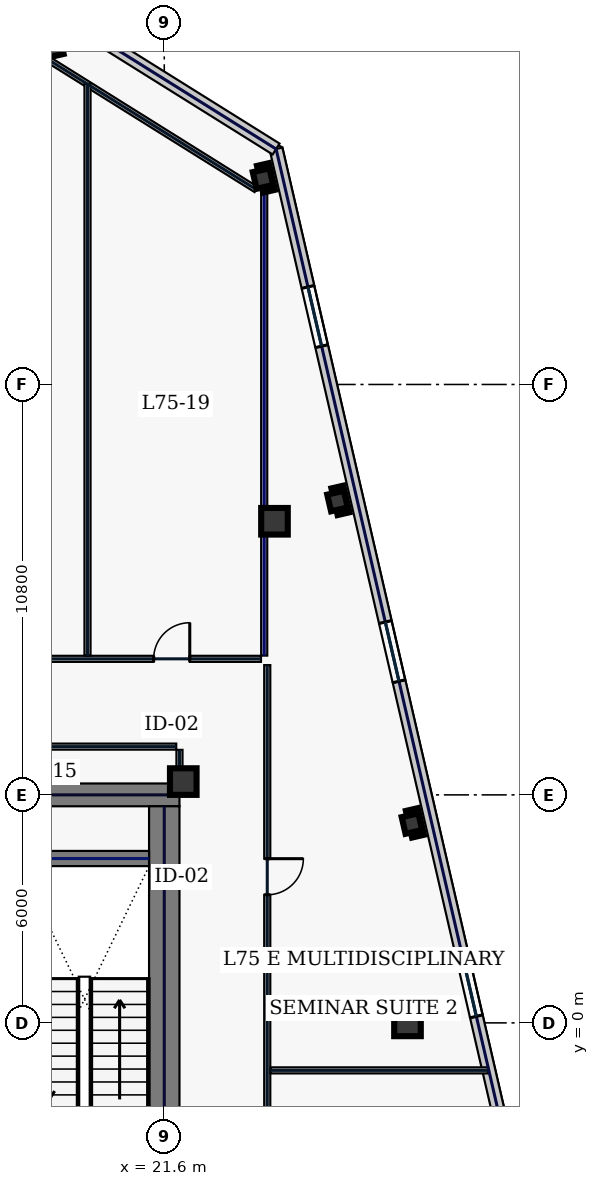
"""IFC4 building model, lengths in metres.
Left out: names, types, materials, properties, quantities, classifications, styles, units other than length and angle.
Written with IfcOpenShell. Run it as: python <this file> out.ifc"""

import sys

from ifc_helpers import new_model, si_unit, direction, frame, frame_2d, origin, origin_2d, place, context, subcontext, project, spatial, rectangle, hollow_rectangle, extrude, element, fill, save


model = new_model("IFC4")
c1 = context("Model", 3, precision=1e-05, world=origin(), true_north=direction((0.0, 1.0)))
c2 = subcontext(c1, "Body", "Model", "MODEL_VIEW")
j1 = project(units=[si_unit("LENGTHUNIT", "METRE"), si_unit("PLANEANGLEUNIT", "RADIAN")], contexts=[c1])
p1 = place(None, origin())
s1 = spatial("IfcSite", under=j1, at=p1, CompositionType="ELEMENT")
p2 = place(p1, origin())
s2 = spatial("IfcBuilding", under=s1, at=p2, CompositionType="ELEMENT")
p3 = place(p2, frame((0.0, 0.0, 321.0)))
s3 = spatial("IfcBuildingStorey", under=s2, at=p3, CompositionType="ELEMENT", Elevation=321.0)
p4 = place(p3, frame((10.5, 6.0, 0.0), z_axis=(0.0, 0.0, 1.0), x_axis=(1.0, 0.0, 0.0)))
e1 = element("IfcWall", 1, at=p4, inside=s3, PredefinedType="SHEAR", context=c2, shape_type="SweptSolid", body=[
    extrude(rectangle(XDim=11.5, YDim=0.6, at=frame_2d((5.75, 0.0))), origin(), (0.0, 0.0, 1.0), 3.74),
])
p5 = place(p3, frame((21.6, -5.7, 0.0), z_axis=(0.0, 0.0, 1.0), x_axis=(0.0, 1.0, 0.0)))
e2 = element("IfcWall", 2, at=p5, inside=s3, PredefinedType="SHEAR", context=c2, shape_type="SweptSolid", body=[
    extrude(rectangle(XDim=11.4, YDim=0.8, at=frame_2d((5.7, 0.0))), origin(), (0.0, 0.0, 1.0), 3.74),
])
p6 = place(p3, frame((17.8, 4.325, 0.0), z_axis=(0.0, 0.0, 1.0), x_axis=(1.0, 0.0, 0.0)))
e3 = element("IfcWall", 3, at=p6, inside=s3, PredefinedType="SHEAR", context=c2, shape_type="SweptSolid", body=[
    extrude(rectangle(XDim=3.4, YDim=0.4, at=frame_2d((1.7, 0.0))), origin(), (0.0, 0.0, 1.0), 3.74),
])
for number, where, z_axis, x_axis in (
    (4, (22.1, 6.35, 0.0), (0.0, 0.0, 1.0), (1.0, 0.0, 0.0)),
    (5, (24.5, 13.2, 0.0), (0.0, 0.0, 1.0), (1.0, 0.0, 0.0)),
    (6, (28.0, 0.0, 0.0), (0.0, 0.0, 1.0), (1.0, 0.0, 0.0)),
):
    element("IfcColumn", number, at=place(p3, frame(where, z_axis=z_axis, x_axis=x_axis)), inside=s3, PredefinedType="COLUMN", context=c2, shape_type="SweptSolid", body=[
        extrude(hollow_rectangle(XDim=0.7, YDim=0.7, WallThickness=0.032, at=origin_2d()), origin(), (0.0, 0.0, 1.0), 3.74),
    ])
for number, where, z_axis, x_axis in (
    (7, (18.682, 25.666, 0.0), (0.0, 0.0, 1.0), (0.974, 0.225, 0.0)),
    (8, (28.117, 5.246, 0.0), (0.0, 0.0, 1.0), (0.974, 0.225, 0.0)),
    (9, (26.158, 13.732, 0.0), (0.0, 0.0, 1.0), (0.974, 0.225, 0.0)),
    (10, (24.198, 22.219, 0.0), (0.0, 0.0, 1.0), (0.974, 0.225, 0.0)),
):
    element("IfcColumn", number, at=place(p3, frame(where, z_axis=z_axis, x_axis=x_axis)), inside=s3, PredefinedType="COLUMN", context=c2, shape_type="SweptSolid", body=[
        extrude(hollow_rectangle(XDim=0.45, YDim=0.45, WallThickness=0.022, at=origin_2d()), origin(), (0.0, 0.0, 1.0), 3.74),
    ])
p7 = place(p3, frame((19.229, 26.316, 0.0), z_axis=(0.0, 0.0, 1.0), x_axis=(-0.974372473594, -0.224940620392, 0.0)))
e11 = element("IfcWall", 11, at=p7, inside=s3, PredefinedType="STANDARD", context=c2, shape_type="SweptSolid", body=[
    extrude(rectangle(XDim=17.366, YDim=0.34, at=frame_2d((8.683, 0.0))), origin(), (0.0, 0.0, 1.0), 3.74),
])
p8 = place(p7, frame((13.187, 0.0, 1.0)))
e12 = element("IfcOpeningElement", 12, at=p8, cuts=e11, PredefinedType="OPENING", context=c2, shape_type="SweptSolid", body=[
    extrude(rectangle(XDim=1.4, YDim=1.85, at=frame_2d((0.7, 0.925))), frame((0.0, 0.18, 0.0), z_axis=(0.0, -1.0, 0.0), x_axis=(1.0, 0.0, 0.0)), (0.0, 0.0, 1.0), 0.36),
])
p9 = place(p7, frame((5.553, 0.0, 1.0)))
e13 = element("IfcOpeningElement", 13, at=p9, cuts=e11, PredefinedType="OPENING", context=c2, shape_type="SweptSolid", body=[
    extrude(rectangle(XDim=1.4, YDim=1.85, at=frame_2d((0.7, 0.925))), frame((0.0, 0.18, 0.0), z_axis=(0.0, -1.0, 0.0), x_axis=(1.0, 0.0, 0.0)), (0.0, 0.0, 1.0), 0.36),
])
p10 = place(p7, frame((2.041, 0.0, 1.0)))
e14 = element("IfcOpeningElement", 14, at=p10, cuts=e11, PredefinedType="OPENING", context=c2, shape_type="SweptSolid", body=[
    extrude(rectangle(XDim=1.4, YDim=1.85, at=frame_2d((0.7, 0.925))), frame((0.0, 0.18, 0.0), z_axis=(0.0, -1.0, 0.0), x_axis=(1.0, 0.0, 0.0)), (0.0, 0.0, 1.0), 0.36),
])
p11 = place(p3, frame((32.686, -12.276, 0.0), z_axis=(0.0, 0.0, 1.0), x_axis=(-0.224953091034, 0.974369594576, 0.0)))
e15 = element("IfcWall", 15, at=p11, inside=s3, PredefinedType="STANDARD", context=c2, shape_type="SweptSolid", body=[
    extrude(rectangle(XDim=36.2, YDim=0.34, at=frame_2d((18.1, 0.0))), origin(), (0.0, 0.0, 1.0), 3.74),
])
p12 = place(p11, frame((3.725, 0.0, 0.58)))
e16 = element("IfcOpeningElement", 16, at=p12, cuts=e15, PredefinedType="OPENING", context=c2, shape_type="SweptSolid", body=[
    extrude(rectangle(XDim=1.6, YDim=2.3, at=frame_2d((0.8, 1.15))), frame((0.0, 0.18, 0.0), z_axis=(0.0, -1.0, 0.0), x_axis=(1.0, 0.0, 0.0)), (0.0, 0.0, 1.0), 0.36),
])
p13 = place(p11, frame((12.775, 0.0, 0.58)))
e17 = element("IfcOpeningElement", 17, at=p13, cuts=e15, PredefinedType="OPENING", context=c2, shape_type="SweptSolid", body=[
    extrude(rectangle(XDim=1.6, YDim=2.3, at=frame_2d((0.8, 1.15))), frame((0.0, 0.18, 0.0), z_axis=(0.0, -1.0, 0.0), x_axis=(1.0, 0.0, 0.0)), (0.0, 0.0, 1.0), 0.36),
])
p14 = place(p11, frame((21.825, 0.0, 0.58)))
e18 = element("IfcOpeningElement", 18, at=p14, cuts=e15, PredefinedType="OPENING", context=c2, shape_type="SweptSolid", body=[
    extrude(rectangle(XDim=1.6, YDim=2.3, at=frame_2d((0.8, 1.15))), frame((0.0, 0.18, 0.0), z_axis=(0.0, -1.0, 0.0), x_axis=(1.0, 0.0, 0.0)), (0.0, 0.0, 1.0), 0.36),
])
p15 = place(p11, frame((30.875, 0.0, 0.58)))
e19 = element("IfcOpeningElement", 19, at=p15, cuts=e15, PredefinedType="OPENING", context=c2, shape_type="SweptSolid", body=[
    extrude(rectangle(XDim=1.6, YDim=2.3, at=frame_2d((0.8, 1.15))), frame((0.0, 0.18, 0.0), z_axis=(0.0, -1.0, 0.0), x_axis=(1.0, 0.0, 0.0)), (0.0, 0.0, 1.0), 0.36),
])
p16 = place(p3, frame((24.542, 22.996, 0.0), z_axis=(0.0, 0.0, 1.0), x_axis=(-0.848055220921, 0.529907862057, 0.0)))
e20 = element("IfcWall", 20, at=p16, inside=s3, PredefinedType="STANDARD", context=c2, shape_type="SweptSolid", body=[
    extrude(rectangle(XDim=6.265, YDim=0.34, at=frame_2d((3.132, 0.0))), origin(), (0.0, 0.0, 1.0), 3.74),
])
p17 = place(p3, frame((24.018, 21.931, 0.0), z_axis=(0.0, 0.0, 1.0), x_axis=(-0.848051009591, 0.529914601736, 0.0)))
e21 = element("IfcWall", 21, at=p17, inside=s3, PredefinedType="PARTITIONING", context=c2, shape_type="SweptSolid", body=[
    extrude(rectangle(XDim=6.505, YDim=0.16, at=frame_2d((3.253, 0.0))), origin(), (0.0, 0.0, 1.0), 3.74),
])
p18 = place(p3, frame((-24.145, 9.58, 0.0), z_axis=(0.0, 0.0, 1.0), x_axis=(1.0, 0.0, 0.0)))
e22 = element("IfcWall", 22, at=p18, inside=s3, PredefinedType="PARTITIONING", context=c2, shape_type="SweptSolid", body=[
    extrude(rectangle(XDim=48.29, YDim=0.16, at=frame_2d((24.145, 0.0))), origin(), (0.0, 0.0, 1.0), 3.74),
])
p19 = place(p18, frame((1.869, 0.0, 0.0)))
e23 = element("IfcOpeningElement", 23, at=p19, cuts=e22, PredefinedType="OPENING", context=c2, shape_type="SweptSolid", body=[
    extrude(rectangle(XDim=1.3, YDim=2.2, at=frame_2d((0.65, 1.1))), frame((0.0, 0.09, 0.0), z_axis=(0.0, -1.0, 0.0), x_axis=(1.0, 0.0, 0.0)), (0.0, 0.0, 1.0), 0.18),
])
p20 = place(p18, frame((8.385, 0.0, 0.0)))
e24 = element("IfcOpeningElement", 24, at=p20, cuts=e22, PredefinedType="OPENING", context=c2, shape_type="SweptSolid", body=[
    extrude(rectangle(XDim=0.95, YDim=2.2, at=frame_2d((0.475, 1.1))), frame((0.0, 0.09, 0.0), z_axis=(0.0, -1.0, 0.0), x_axis=(1.0, 0.0, 0.0)), (0.0, 0.0, 1.0), 0.18),
])
p21 = place(p18, frame((16.475, 0.0, 0.0)))
e25 = element("IfcOpeningElement", 25, at=p21, cuts=e22, PredefinedType="OPENING", context=c2, shape_type="SweptSolid", body=[
    extrude(rectangle(XDim=0.95, YDim=2.2, at=frame_2d((0.475, 1.1))), frame((0.0, 0.09, 0.0), z_axis=(0.0, -1.0, 0.0), x_axis=(1.0, 0.0, 0.0)), (0.0, 0.0, 1.0), 0.18),
])
p22 = place(p18, frame((23.055, 0.0, 0.0)))
e26 = element("IfcOpeningElement", 26, at=p22, cuts=e22, PredefinedType="OPENING", context=c2, shape_type="SweptSolid", body=[
    extrude(rectangle(XDim=0.95, YDim=2.2, at=frame_2d((0.475, 1.1))), frame((0.0, 0.09, 0.0), z_axis=(0.0, -1.0, 0.0), x_axis=(1.0, 0.0, 0.0)), (0.0, 0.0, 1.0), 0.18),
])
p23 = place(p18, frame((29.085, 0.0, 0.0)))
e27 = element("IfcOpeningElement", 27, at=p23, cuts=e22, PredefinedType="OPENING", context=c2, shape_type="SweptSolid", body=[
    extrude(rectangle(XDim=1.45, YDim=2.2, at=frame_2d((0.725, 1.1))), frame((0.0, 0.09, 0.0), z_axis=(0.0, -1.0, 0.0), x_axis=(1.0, 0.0, 0.0)), (0.0, 0.0, 1.0), 0.18),
])
p24 = place(p18, frame((35.82, 0.0, 0.0)))
e28 = element("IfcOpeningElement", 28, at=p24, cuts=e22, PredefinedType="OPENING", context=c2, shape_type="SweptSolid", body=[
    extrude(rectangle(XDim=1.15, YDim=2.2, at=frame_2d((0.575, 1.1))), frame((0.0, 0.09, 0.0), z_axis=(0.0, -1.0, 0.0), x_axis=(1.0, 0.0, 0.0)), (0.0, 0.0, 1.0), 0.18),
])
p25 = place(p18, frame((41.105, 0.0, 0.0)))
e29 = element("IfcOpeningElement", 29, at=p25, cuts=e22, PredefinedType="OPENING", context=c2, shape_type="SweptSolid", body=[
    extrude(rectangle(XDim=0.95, YDim=2.2, at=frame_2d((0.475, 1.1))), frame((0.0, 0.09, 0.0), z_axis=(0.0, -1.0, 0.0), x_axis=(1.0, 0.0, 0.0)), (0.0, 0.0, 1.0), 0.18),
])
p26 = place(p18, frame((45.466, 0.0, 0.0)))
e30 = element("IfcOpeningElement", 30, at=p26, cuts=e22, PredefinedType="OPENING", context=c2, shape_type="SweptSolid", body=[
    extrude(rectangle(XDim=0.95, YDim=2.2, at=frame_2d((0.475, 1.1))), frame((0.0, 0.09, 0.0), z_axis=(0.0, -1.0, 0.0), x_axis=(1.0, 0.0, 0.0)), (0.0, 0.0, 1.0), 0.18),
])
p27 = place(p3, frame((24.31, 9.415, 0.0), z_axis=(0.0, 0.0, 1.0), x_axis=(0.0, -1.0, 0.0)))
e31 = element("IfcWall", 31, at=p27, inside=s3, PredefinedType="PARTITIONING", context=c2, shape_type="SweptSolid", body=[
    extrude(rectangle(XDim=18.63, YDim=0.16, at=frame_2d((9.315, 0.0))), origin(), (0.0, 0.0, 1.0), 3.74),
])
p28 = place(p27, frame((14.106, 0.0, 0.0)))
e32 = element("IfcOpeningElement", 32, at=p28, cuts=e31, PredefinedType="OPENING", context=c2, shape_type="SweptSolid", body=[
    extrude(rectangle(XDim=0.95, YDim=2.2, at=frame_2d((0.475, 1.1))), frame((0.0, 0.09, 0.0), z_axis=(0.0, -1.0, 0.0), x_axis=(1.0, 0.0, 0.0)), (0.0, 0.0, 1.0), 0.18),
])
p29 = place(p27, frame((5.094, 0.0, 0.0)))
e33 = element("IfcOpeningElement", 33, at=p29, cuts=e31, PredefinedType="OPENING", context=c2, shape_type="SweptSolid", body=[
    extrude(rectangle(XDim=0.95, YDim=2.2, at=frame_2d((0.475, 1.1))), frame((0.0, 0.09, 0.0), z_axis=(0.0, -1.0, 0.0), x_axis=(1.0, 0.0, 0.0)), (0.0, 0.0, 1.0), 0.18),
])
p30 = place(p3, frame((21.915, 7.27, 0.0), z_axis=(0.0, 0.0, 1.0), x_axis=(-1.0, 0.0, 0.0)))
e34 = element("IfcWall", 34, at=p30, inside=s3, PredefinedType="PARTITIONING", context=c2, shape_type="SweptSolid", body=[
    extrude(rectangle(XDim=11.2, YDim=0.16, at=frame_2d((5.6, 0.0))), origin(), (0.0, 0.0, 1.0), 3.74),
])
p31 = place(p3, frame((22.0, 6.42, 0.0), z_axis=(0.0, 0.0, 1.0), x_axis=(0.0, 1.0, 0.0)))
e35 = element("IfcWall", 35, at=p31, inside=s3, PredefinedType="PARTITIONING", context=c2, shape_type="SweptSolid", body=[
    extrude(rectangle(XDim=0.765, YDim=0.16, at=frame_2d((0.383, 0.0))), origin(), (0.0, 0.0, 1.0), 3.74),
])
p32 = place(p3, frame((24.23, 9.665, 0.0), z_axis=(0.0, 0.0, 1.0), x_axis=(0.0, 1.0, 0.0)))
e36 = element("IfcWall", 36, at=p32, inside=s3, PredefinedType="PARTITIONING", context=c2, shape_type="SweptSolid", body=[
    extrude(rectangle(XDim=12.906, YDim=0.16, at=frame_2d((6.453, 0.0))), origin(), (0.0, 0.0, 1.0), 3.185),
])
p33 = place(p3, frame((19.58, 9.665, 0.0), z_axis=(0.0, 0.0, 1.0), x_axis=(0.0, 1.0, 0.0)))
e37 = element("IfcWall", 37, at=p33, inside=s3, PredefinedType="PARTITIONING", context=c2, shape_type="SweptSolid", body=[
    extrude(rectangle(XDim=15.048, YDim=0.16, at=frame_2d((7.524, 0.0))), origin(), (0.0, 0.0, 1.0), 3.74),
])
p34 = place(p3, frame((24.395, -1.25, 0.0), z_axis=(0.0, 0.0, 1.0), x_axis=(1.0, 0.0, 0.0)))
e38 = element("IfcWall", 38, at=p34, inside=s3, PredefinedType="PARTITIONING", context=c2, shape_type="SweptSolid", body=[
    extrude(rectangle(XDim=5.725, YDim=0.16, at=frame_2d((2.862, 0.0))), origin(), (0.0, 0.0, 1.0), 3.74),
])
p35 = place(p13, origin())
e39 = element("IfcWindow", 39, at=p35, inside=s3, PartitioningType="SINGLE_PANEL", PredefinedType="WINDOW", context=c2, shape_type="SweptSolid", body=[
    extrude(rectangle(XDim=1.6, YDim=2.3, at=frame_2d((0.8, 1.15))), frame((0.0, 0.03, 0.0), z_axis=(0.0, -1.0, 0.0), x_axis=(1.0, 0.0, 0.0)), (0.0, 0.0, 1.0), 0.06),
])
fill(e17, e39)
p36 = place(p14, origin())
e40 = element("IfcWindow", 40, at=p36, inside=s3, PartitioningType="SINGLE_PANEL", PredefinedType="WINDOW", context=c2, shape_type="SweptSolid", body=[
    extrude(rectangle(XDim=1.6, YDim=2.3, at=frame_2d((0.8, 1.15))), frame((0.0, 0.03, 0.0), z_axis=(0.0, -1.0, 0.0), x_axis=(1.0, 0.0, 0.0)), (0.0, 0.0, 1.0), 0.06),
])
fill(e18, e40)
p37 = place(p15, origin())
e41 = element("IfcWindow", 41, at=p37, inside=s3, PartitioningType="SINGLE_PANEL", PredefinedType="WINDOW", context=c2, shape_type="SweptSolid", body=[
    extrude(rectangle(XDim=1.6, YDim=2.3, at=frame_2d((0.8, 1.15))), frame((0.0, 0.03, 0.0), z_axis=(0.0, -1.0, 0.0), x_axis=(1.0, 0.0, 0.0)), (0.0, 0.0, 1.0), 0.06),
])
fill(e19, e41)
p38 = place(p26, origin())
e42 = element("IfcDoor", 42, at=p38, inside=s3, OperationType="SINGLE_SWING_RIGHT", PredefinedType="DOOR", context=c2, shape_type="SweptSolid", body=[
    extrude(rectangle(XDim=0.95, YDim=2.2, at=frame_2d((0.475, 1.1))), frame((0.0, 0.025, 0.0), z_axis=(0.0, -1.0, 0.0), x_axis=(1.0, 0.0, 0.0)), (0.0, 0.0, 1.0), 0.05),
])
fill(e30, e42)
p39 = place(p29, origin())
e43 = element("IfcDoor", 43, at=p39, inside=s3, OperationType="SINGLE_SWING_LEFT", PredefinedType="DOOR", context=c2, shape_type="SweptSolid", body=[
    extrude(rectangle(XDim=0.95, YDim=2.2, at=frame_2d((0.475, 1.1))), frame((0.0, 0.025, 0.0), z_axis=(0.0, -1.0, 0.0), x_axis=(1.0, 0.0, 0.0)), (0.0, 0.0, 1.0), 0.05),
])
fill(e33, e43)
save(model, sys.argv[1])
